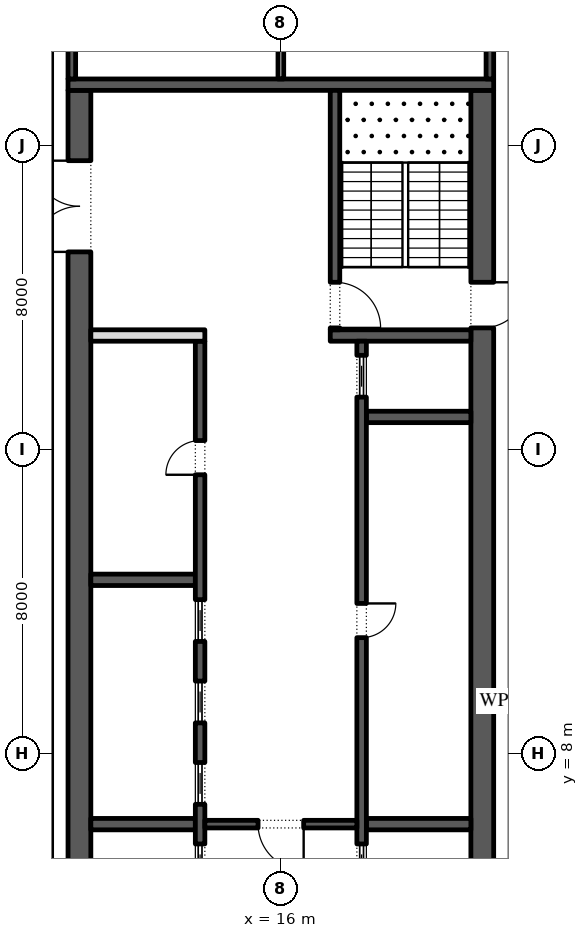
"""IFC4 building model, lengths in metres.
Left out: names, types, materials, properties, quantities, classifications, styles, units other than length and angle.
Written with IfcOpenShell. Run it as: python <this file> out.ifc"""

import sys

from ifc_helpers import new_model, si_unit, direction, frame, frame_2d, origin, place, context, subcontext, project, spatial, rectangle, extrude, element, fill, save


model = new_model("IFC4")
c1 = context("Model", 3, precision=1e-05, world=origin(), true_north=direction((0.0, 1.0)))
c2 = subcontext(c1, "Body", "Model", "MODEL_VIEW")
j1 = project(units=[si_unit("LENGTHUNIT", "METRE"), si_unit("PLANEANGLEUNIT", "RADIAN")], contexts=[c1])
p1 = place(None, origin())
s1 = spatial("IfcSite", under=j1, at=p1, CompositionType="ELEMENT")
p2 = place(p1, origin())
s2 = spatial("IfcBuilding", under=s1, at=p2, CompositionType="ELEMENT")
p3 = place(p2, frame((0.0, 0.0, 268.2)))
s3 = spatial("IfcBuildingStorey", under=s2, at=p3, CompositionType="ELEMENT", Elevation=268.2)
p4 = place(p3, frame((21.359, -11.678, 0.0), z_axis=(0.0, 0.0, 1.0), x_axis=(0.224949198343, 0.974370493275, 0.0)))
e1 = element("IfcWall", 1, at=p4, inside=s3, PredefinedType="STANDARD", context=c2, shape_type="SweptSolid", body=[
    extrude(rectangle(XDim=49.5, YDim=0.3, at=frame_2d((24.75, 0.0))), origin(), (0.0, 0.0, 1.0), 4.0),
])
p5 = place(p4, frame((1.157, 0.0, 0.45)))
e2 = element("IfcOpeningElement", 2, at=p5, cuts=e1, PredefinedType="OPENING", context=c2, shape_type="SweptSolid", body=[
    extrude(rectangle(XDim=4.5, YDim=3.05, at=frame_2d((2.25, 1.525))), frame((0.0, 0.16, 0.0), z_axis=(0.0, -1.0, 0.0), x_axis=(1.0, 0.0, 0.0)), (0.0, 0.0, 1.0), 0.32),
])
p6 = place(p4, frame((8.121, 0.0, 0.45)))
e3 = element("IfcOpeningElement", 3, at=p6, cuts=e1, PredefinedType="OPENING", context=c2, shape_type="SweptSolid", body=[
    extrude(rectangle(XDim=4.5, YDim=3.05, at=frame_2d((2.25, 1.525))), frame((0.0, 0.16, 0.0), z_axis=(0.0, -1.0, 0.0), x_axis=(1.0, 0.0, 0.0)), (0.0, 0.0, 1.0), 0.32),
])
p7 = place(p4, frame((15.236, 0.0, 0.45)))
e4 = element("IfcOpeningElement", 4, at=p7, cuts=e1, PredefinedType="OPENING", context=c2, shape_type="SweptSolid", body=[
    extrude(rectangle(XDim=4.5, YDim=3.05, at=frame_2d((2.25, 1.525))), frame((0.0, 0.16, 0.0), z_axis=(0.0, -1.0, 0.0), x_axis=(1.0, 0.0, 0.0)), (0.0, 0.0, 1.0), 0.32),
])
p8 = place(p4, frame((22.35, 0.0, 0.45)))
e5 = element("IfcOpeningElement", 5, at=p8, cuts=e1, PredefinedType="OPENING", context=c2, shape_type="SweptSolid", body=[
    extrude(rectangle(XDim=4.5, YDim=3.05, at=frame_2d((2.25, 1.525))), frame((0.0, 0.16, 0.0), z_axis=(0.0, -1.0, 0.0), x_axis=(1.0, 0.0, 0.0)), (0.0, 0.0, 1.0), 0.32),
])
p9 = place(p4, frame((29.464, 0.0, 0.45)))
e6 = element("IfcOpeningElement", 6, at=p9, cuts=e1, PredefinedType="OPENING", context=c2, shape_type="SweptSolid", body=[
    extrude(rectangle(XDim=4.5, YDim=2.95, at=frame_2d((2.25, 1.475))), frame((0.0, 0.16, 0.0), z_axis=(0.0, -1.0, 0.0), x_axis=(1.0, 0.0, 0.0)), (0.0, 0.0, 1.0), 0.32),
])
p10 = place(p4, frame((37.628, 0.0, 0.0)))
e7 = element("IfcOpeningElement", 7, at=p10, cuts=e1, PredefinedType="OPENING", context=c2, shape_type="SweptSolid", body=[
    extrude(rectangle(XDim=2.4, YDim=3.325, at=frame_2d((1.2, 1.663))), frame((0.0, 0.16, 0.0), z_axis=(0.0, -1.0, 0.0), x_axis=(1.0, 0.0, 0.0)), (0.0, 0.0, 1.0), 0.32),
])
p11 = place(p4, frame((43.693, 0.0, 0.45)))
e8 = element("IfcOpeningElement", 8, at=p11, cuts=e1, PredefinedType="OPENING", context=c2, shape_type="SweptSolid", body=[
    extrude(rectangle(XDim=4.5, YDim=3.05, at=frame_2d((2.25, 1.525))), frame((0.0, 0.16, 0.0), z_axis=(0.0, -1.0, 0.0), x_axis=(1.0, 0.0, 0.0)), (0.0, 0.0, 1.0), 0.32),
])
p12 = place(p3, frame((21.3, -2.45, 0.0), z_axis=(0.0, 0.0, 1.0), x_axis=(0.0, 1.0, 0.0)))
e9 = element("IfcWall", 9, at=p12, inside=s3, PredefinedType="SHEAR", context=c2, shape_type="SweptSolid", body=[
    extrude(rectangle(XDim=27.9, YDim=0.6, at=frame_2d((13.95, 0.0))), origin(), (0.0, 0.0, 1.0), 4.0),
])
p13 = place(p12, frame((5.05, 0.0, 0.0)))
e10 = element("IfcOpeningElement", 10, at=p13, cuts=e9, PredefinedType="OPENING", context=c2, shape_type="SweptSolid", body=[
    extrude(rectangle(XDim=1.2, YDim=2.1, at=frame_2d((0.6, 1.05))), frame((0.0, 0.31, 0.0), z_axis=(0.0, -1.0, 0.0), x_axis=(1.0, 0.0, 0.0)), (0.0, 0.0, 1.0), 0.62),
])
p14 = place(p12, frame((21.65, 0.0, 0.0)))
e11 = element("IfcOpeningElement", 11, at=p14, cuts=e9, PredefinedType="OPENING", context=c2, shape_type="SweptSolid", body=[
    extrude(rectangle(XDim=1.2, YDim=2.1, at=frame_2d((0.6, 1.05))), frame((0.0, 0.31, 0.0), z_axis=(0.0, -1.0, 0.0), x_axis=(1.0, 0.0, 0.0)), (0.0, 0.0, 1.0), 0.62),
])
p15 = place(p3, frame((10.7, -2.45, 0.0), z_axis=(0.0, 0.0, 1.0), x_axis=(0.0, 1.0, 0.0)))
e12 = element("IfcWall", 12, at=p15, inside=s3, PredefinedType="SHEAR", context=c2, shape_type="SweptSolid", body=[
    extrude(rectangle(XDim=27.9, YDim=0.6, at=frame_2d((13.95, 0.0))), origin(), (0.0, 0.0, 1.0), 4.0),
])
p16 = place(p15, frame((23.65, 0.0, 0.0)))
e13 = element("IfcOpeningElement", 13, at=p16, cuts=e12, PredefinedType="OPENING", context=c2, shape_type="SweptSolid", body=[
    extrude(rectangle(XDim=2.4, YDim=2.1, at=frame_2d((1.2, 1.05))), frame((0.0, 0.31, 0.0), z_axis=(0.0, -1.0, 0.0), x_axis=(1.0, 0.0, 0.0)), (0.0, 0.0, 1.0), 0.62),
])
p17 = place(p15, frame((1.087, 0.0, 0.0)))
e14 = element("IfcOpeningElement", 14, at=p17, cuts=e12, PredefinedType="OPENING", context=c2, shape_type="SweptSolid", body=[
    extrude(rectangle(XDim=0.9, YDim=2.1, at=frame_2d((0.45, 1.05))), frame((0.0, 0.31, 0.0), z_axis=(0.0, -1.0, 0.0), x_axis=(1.0, 0.0, 0.0)), (0.0, 0.0, 1.0), 0.62),
])
p18 = place(p15, frame((4.262, 0.0, 0.0)))
e15 = element("IfcOpeningElement", 15, at=p18, cuts=e12, PredefinedType="OPENING", context=c2, shape_type="SweptSolid", body=[
    extrude(rectangle(XDim=1.0, YDim=2.1, at=frame_2d((0.5, 1.05))), frame((0.0, 0.31, 0.0), z_axis=(0.0, -1.0, 0.0), x_axis=(1.0, 0.0, 0.0)), (0.0, 0.0, 1.0), 0.62),
])
p19 = place(p3, frame((10.4, 25.6, 0.0), z_axis=(0.0, 0.0, 1.0), x_axis=(1.0, 0.0, 0.0)))
e16 = element("IfcWall", 16, at=p19, inside=s3, PredefinedType="SHEAR", context=c2, shape_type="SweptSolid", body=[
    extrude(rectangle(XDim=11.2, YDim=0.3, at=frame_2d((5.6, 0.0))), origin(), (0.0, 0.0, 1.0), 4.0),
])
p20 = place(p3, frame((17.3, 19.0, 0.0), z_axis=(0.0, 0.0, 1.0), x_axis=(1.0, 0.0, 0.0)))
e17 = element("IfcWall", 17, at=p20, inside=s3, PredefinedType="SHEAR", context=c2, shape_type="SweptSolid", body=[
    extrude(rectangle(XDim=3.7, YDim=0.3, at=frame_2d((1.85, 0.0))), origin(), (0.0, 0.0, 1.0), 4.0),
])
p21 = place(p3, frame((17.425, 19.15, 0.0), z_axis=(0.0, 0.0, 1.0), x_axis=(0.0, 1.0, 0.0)))
e18 = element("IfcWall", 18, at=p21, inside=s3, PredefinedType="SHEAR", context=c2, shape_type="SweptSolid", body=[
    extrude(rectangle(XDim=6.3, YDim=0.25, at=frame_2d((3.15, 0.0))), origin(), (0.0, 0.0, 1.0), 4.0),
])
p22 = place(p21, frame((0.05, 0.0, 0.0)))
e19 = element("IfcOpeningElement", 19, at=p22, cuts=e18, PredefinedType="OPENING", context=c2, shape_type="SweptSolid", body=[
    extrude(rectangle(XDim=1.2, YDim=2.1, at=frame_2d((0.6, 1.05))), frame((0.0, 0.135, 0.0), z_axis=(0.0, -1.0, 0.0), x_axis=(1.0, 0.0, 0.0)), (0.0, 0.0, 1.0), 0.27),
])
for number, where, z_axis, x_axis in (
    (20, (18.25, 6.143, 0.0), (0.0, 0.0, 1.0), (1.0, 0.0, 0.0)),
    (21, (18.25, 16.857, 0.0), (0.0, 0.0, 1.0), (1.0, 0.0, 0.0)),
):
    element("IfcWall", number, at=place(p3, frame(where, z_axis=z_axis, x_axis=x_axis)), inside=s3, PredefinedType="SHEAR", context=c2, shape_type="SweptSolid", body=[
        extrude(rectangle(XDim=2.75, YDim=0.3, at=frame_2d((1.375, 0.0))), origin(), (0.0, 0.0, 1.0), 4.0),
    ])
p23 = place(p3, frame((18.125, 4.15, 0.0), z_axis=(0.0, 0.0, 1.0), x_axis=(0.0, 1.0, 0.0)))
e22 = element("IfcWall", 22, at=p23, inside=s3, PredefinedType="SHEAR", context=c2, shape_type="SweptSolid", body=[
    extrude(rectangle(XDim=14.7, YDim=0.25, at=frame_2d((7.35, 0.0))), origin(), (0.0, 0.0, 1.0), 4.0),
])
p24 = place(p23, frame((6.9, 0.0, 0.0)))
e23 = element("IfcOpeningElement", 23, at=p24, cuts=e22, PredefinedType="OPENING", context=c2, shape_type="SweptSolid", body=[
    extrude(rectangle(XDim=0.9, YDim=2.1, at=frame_2d((0.45, 1.05))), frame((0.0, 0.135, 0.0), z_axis=(0.0, -1.0, 0.0), x_axis=(1.0, 0.0, 0.0)), (0.0, 0.0, 1.0), 0.27),
])
p25 = place(p23, frame((0.371, 0.0, 0.0)))
e24 = element("IfcOpeningElement", 24, at=p25, cuts=e22, PredefinedType="OPENING", context=c2, shape_type="SweptSolid", body=[
    extrude(rectangle(XDim=1.1, YDim=2.1, at=frame_2d((0.55, 1.05))), frame((0.0, 0.135, 0.0), z_axis=(0.0, -1.0, 0.0), x_axis=(1.0, 0.0, 0.0)), (0.0, 0.0, 1.0), 0.27),
])
p26 = place(p23, frame((13.229, 0.0, 0.0)))
e25 = element("IfcOpeningElement", 25, at=p26, cuts=e22, PredefinedType="OPENING", context=c2, shape_type="SweptSolid", body=[
    extrude(rectangle(XDim=1.1, YDim=2.1, at=frame_2d((0.55, 1.05))), frame((0.0, 0.135, 0.0), z_axis=(0.0, -1.0, 0.0), x_axis=(1.0, 0.0, 0.0)), (0.0, 0.0, 1.0), 0.27),
])
for number, where, z_axis, x_axis in (
    (26, (11.0, 6.143, 0.0), (0.0, 0.0, 1.0), (1.0, 0.0, 0.0)),
    (27, (11.0, 12.571, 0.0), (0.0, 0.0, 1.0), (1.0, 0.0, 0.0)),
):
    element("IfcWall", number, at=place(p3, frame(where, z_axis=z_axis, x_axis=x_axis)), inside=s3, PredefinedType="SHEAR", context=c2, shape_type="SweptSolid", body=[
        extrude(rectangle(XDim=2.75, YDim=0.3, at=frame_2d((1.375, 0.0))), origin(), (0.0, 0.0, 1.0), 4.0),
    ])
p27 = place(p3, frame((13.875, -2.45, 0.0), z_axis=(0.0, 0.0, 1.0), x_axis=(0.0, 1.0, 0.0)))
e28 = element("IfcWall", 28, at=p27, inside=s3, PredefinedType="SHEAR", context=c2, shape_type="SweptSolid", body=[
    extrude(rectangle(XDim=21.3, YDim=0.25, at=frame_2d((10.65, 0.0))), origin(), (0.0, 0.0, 1.0), 4.0),
])
p28 = place(p27, frame((17.786, 0.0, 0.0)))
e29 = element("IfcOpeningElement", 29, at=p28, cuts=e28, PredefinedType="OPENING", context=c2, shape_type="SweptSolid", body=[
    extrude(rectangle(XDim=0.9, YDim=2.1, at=frame_2d((0.45, 1.05))), frame((0.0, 0.135, 0.0), z_axis=(0.0, -1.0, 0.0), x_axis=(1.0, 0.0, 0.0)), (0.0, 0.0, 1.0), 0.27),
])
p29 = place(p27, frame((6.971, 0.0, 0.0)))
e30 = element("IfcOpeningElement", 30, at=p29, cuts=e28, PredefinedType="OPENING", context=c2, shape_type="SweptSolid", body=[
    extrude(rectangle(XDim=1.1, YDim=2.1, at=frame_2d((0.55, 1.05))), frame((0.0, 0.135, 0.0), z_axis=(0.0, -1.0, 0.0), x_axis=(1.0, 0.0, 0.0)), (0.0, 0.0, 1.0), 0.27),
])
p30 = place(p27, frame((9.114, 0.0, 0.0)))
e31 = element("IfcOpeningElement", 31, at=p30, cuts=e28, PredefinedType="OPENING", context=c2, shape_type="SweptSolid", body=[
    extrude(rectangle(XDim=1.1, YDim=2.1, at=frame_2d((0.55, 1.05))), frame((0.0, 0.135, 0.0), z_axis=(0.0, -1.0, 0.0), x_axis=(1.0, 0.0, 0.0)), (0.0, 0.0, 1.0), 0.27),
])
p31 = place(p27, frame((11.257, 0.0, 0.0)))
e32 = element("IfcOpeningElement", 32, at=p31, cuts=e28, PredefinedType="OPENING", context=c2, shape_type="SweptSolid", body=[
    extrude(rectangle(XDim=1.1, YDim=2.1, at=frame_2d((0.55, 1.05))), frame((0.0, 0.135, 0.0), z_axis=(0.0, -1.0, 0.0), x_axis=(1.0, 0.0, 0.0)), (0.0, 0.0, 1.0), 0.27),
])
p32 = place(p27, frame((13.4, 0.0, 0.0)))
e33 = element("IfcOpeningElement", 33, at=p32, cuts=e28, PredefinedType="OPENING", context=c2, shape_type="SweptSolid", body=[
    extrude(rectangle(XDim=1.1, YDim=2.1, at=frame_2d((0.55, 1.05))), frame((0.0, 0.135, 0.0), z_axis=(0.0, -1.0, 0.0), x_axis=(1.0, 0.0, 0.0)), (0.0, 0.0, 1.0), 0.27),
])
p33 = place(p3, frame((11.0, 19.0, 0.0), z_axis=(0.0, 0.0, 1.0), x_axis=(1.0, 0.0, 0.0)))
e34 = element("IfcWall", 34, at=p33, inside=s3, PredefinedType="PARTITIONING", context=c2, shape_type="SweptSolid", body=[
    extrude(rectangle(XDim=3.0, YDim=0.3, at=frame_2d((1.5, 0.0))), origin(), (0.0, 0.0, 1.0), 4.0),
])
p34 = place(p3, frame((14.0, 6.143, 0.0), z_axis=(0.0, 0.0, 1.0), x_axis=(1.0, 0.0, 0.0)))
e35 = element("IfcWall", 35, at=p34, inside=s3, PredefinedType="SHEAR", context=c2, shape_type="SweptSolid", body=[
    extrude(rectangle(XDim=4.0, YDim=0.2, at=frame_2d((2.0, 0.0))), origin(), (0.0, 0.0, 1.0), 4.0),
])
p35 = place(p34, frame((1.4, 0.0, 0.0)))
e36 = element("IfcOpeningElement", 36, at=p35, cuts=e35, PredefinedType="OPENING", context=c2, shape_type="SweptSolid", body=[
    extrude(rectangle(XDim=1.2, YDim=2.1, at=frame_2d((0.6, 1.05))), frame((0.0, 0.11, 0.0), z_axis=(0.0, -1.0, 0.0), x_axis=(1.0, 0.0, 0.0)), (0.0, 0.0, 1.0), 0.22),
])
p36 = place(p3, frame((21.5, 25.75, 0.0), z_axis=(0.0, 0.0, 1.0), x_axis=(0.0, 1.0, 0.0)))
e37 = element("IfcWall", 37, at=p36, inside=s3, PredefinedType="SHEAR", context=c2, shape_type="SweptSolid", body=[
    extrude(rectangle(XDim=4.75, YDim=0.2, at=frame_2d((2.375, 0.0))), origin(), (0.0, 0.0, 1.0), 4.0),
])
p37 = place(p36, frame((1.925, 0.0, 0.0)))
e38 = element("IfcOpeningElement", 38, at=p37, cuts=e37, PredefinedType="OPENING", context=c2, shape_type="SweptSolid", body=[
    extrude(rectangle(XDim=0.9, YDim=2.1, at=frame_2d((0.45, 1.05))), frame((0.0, 0.11, 0.0), z_axis=(0.0, -1.0, 0.0), x_axis=(1.0, 0.0, 0.0)), (0.0, 0.0, 1.0), 0.22),
])
p38 = place(p3, frame((10.5, 25.75, 0.0), z_axis=(0.0, 0.0, 1.0), x_axis=(0.0, 1.0, 0.0)))
e39 = element("IfcWall", 39, at=p38, inside=s3, PredefinedType="SHEAR", context=c2, shape_type="SweptSolid", body=[
    extrude(rectangle(XDim=4.75, YDim=0.2, at=frame_2d((2.375, 0.0))), origin(), (0.0, 0.0, 1.0), 4.0),
])
p39 = place(p38, frame((1.925, 0.0, 0.0)))
e40 = element("IfcOpeningElement", 40, at=p39, cuts=e39, PredefinedType="OPENING", context=c2, shape_type="SweptSolid", body=[
    extrude(rectangle(XDim=0.9, YDim=2.1, at=frame_2d((0.45, 1.05))), frame((0.0, 0.11, 0.0), z_axis=(0.0, -1.0, 0.0), x_axis=(1.0, 0.0, 0.0)), (0.0, 0.0, 1.0), 0.22),
])
p40 = place(p3, frame((16.0, 25.75, 0.0), z_axis=(0.0, 0.0, 1.0), x_axis=(0.0, 1.0, 0.0)))
e41 = element("IfcWall", 41, at=p40, inside=s3, PredefinedType="PARTITIONING", context=c2, shape_type="SweptSolid", body=[
    extrude(rectangle(XDim=4.75, YDim=0.15, at=frame_2d((2.375, 0.0))), origin(), (0.0, 0.0, 1.0), 4.0),
])
p41 = place(p24, frame((0.9, -0.2, 0.0), z_axis=(0.0, 0.0, 1.0), x_axis=(-1.0, 0.0, 0.0)))
e42 = element("IfcDoor", 42, at=p41, inside=s3, OperationType="SINGLE_SWING_RIGHT", PredefinedType="DOOR", context=c2, shape_type="SweptSolid", body=[
    extrude(rectangle(XDim=0.9, YDim=2.1, at=frame_2d((0.45, 1.05))), frame((0.0, -0.075, 0.0), z_axis=(0.0, -1.0, 0.0), x_axis=(1.0, 0.0, 0.0)), (0.0, 0.0, 1.0), 0.05),
])
fill(e23, e42)
p42 = place(p25, origin())
e43 = element("IfcDoor", 43, at=p42, inside=s3, OperationType="SLIDING_TO_LEFT", PredefinedType="DOOR", context=c2, shape_type="SweptSolid", body=[
    extrude(rectangle(XDim=1.1, YDim=2.1, at=frame_2d((0.55, 1.05))), frame((0.0, 0.025, 0.0), z_axis=(0.0, -1.0, 0.0), x_axis=(1.0, 0.0, 0.0)), (0.0, 0.0, 1.0), 0.05),
])
fill(e24, e43)
p43 = place(p26, origin())
e44 = element("IfcDoor", 44, at=p43, inside=s3, OperationType="SLIDING_TO_LEFT", PredefinedType="DOOR", context=c2, shape_type="SweptSolid", body=[
    extrude(rectangle(XDim=1.1, YDim=2.1, at=frame_2d((0.55, 1.05))), frame((0.0, 0.025, 0.0), z_axis=(0.0, -1.0, 0.0), x_axis=(1.0, 0.0, 0.0)), (0.0, 0.0, 1.0), 0.05),
])
fill(e25, e44)
p44 = place(p28, origin())
e45 = element("IfcDoor", 45, at=p44, inside=s3, OperationType="SINGLE_SWING_RIGHT", PredefinedType="DOOR", context=c2, shape_type="SweptSolid", body=[
    extrude(rectangle(XDim=0.9, YDim=2.1, at=frame_2d((0.45, 1.05))), frame((0.0, 0.125, 0.0), z_axis=(0.0, -1.0, 0.0), x_axis=(1.0, 0.0, 0.0)), (0.0, 0.0, 1.0), 0.05),
])
fill(e29, e45)
p45 = place(p29, origin())
e46 = element("IfcDoor", 46, at=p45, inside=s3, OperationType="SLIDING_TO_LEFT", PredefinedType="DOOR", context=c2, shape_type="SweptSolid", body=[
    extrude(rectangle(XDim=1.1, YDim=2.1, at=frame_2d((0.55, 1.05))), frame((0.0, 0.025, 0.0), z_axis=(0.0, -1.0, 0.0), x_axis=(1.0, 0.0, 0.0)), (0.0, 0.0, 1.0), 0.05),
])
fill(e30, e46)
p46 = place(p30, origin())
e47 = element("IfcDoor", 47, at=p46, inside=s3, OperationType="SLIDING_TO_LEFT", PredefinedType="DOOR", context=c2, shape_type="SweptSolid", body=[
    extrude(rectangle(XDim=1.1, YDim=2.1, at=frame_2d((0.55, 1.05))), frame((0.0, 0.025, 0.0), z_axis=(0.0, -1.0, 0.0), x_axis=(1.0, 0.0, 0.0)), (0.0, 0.0, 1.0), 0.05),
])
fill(e31, e47)
p47 = place(p31, origin())
e48 = element("IfcDoor", 48, at=p47, inside=s3, OperationType="SLIDING_TO_LEFT", PredefinedType="DOOR", context=c2, shape_type="SweptSolid", body=[
    extrude(rectangle(XDim=1.1, YDim=2.1, at=frame_2d((0.55, 1.05))), frame((0.0, 0.025, 0.0), z_axis=(0.0, -1.0, 0.0), x_axis=(1.0, 0.0, 0.0)), (0.0, 0.0, 1.0), 0.05),
])
fill(e32, e48)
p48 = place(p32, origin())
e49 = element("IfcDoor", 49, at=p48, inside=s3, OperationType="SLIDING_TO_LEFT", PredefinedType="DOOR", context=c2, shape_type="SweptSolid", body=[
    extrude(rectangle(XDim=1.1, YDim=2.1, at=frame_2d((0.55, 1.05))), frame((0.0, 0.025, 0.0), z_axis=(0.0, -1.0, 0.0), x_axis=(1.0, 0.0, 0.0)), (0.0, 0.0, 1.0), 0.05),
])
fill(e33, e49)
p49 = place(p35, frame((1.2, 0.0, 0.0), z_axis=(0.0, 0.0, 1.0), x_axis=(-1.0, 0.0, 0.0)))
e50 = element("IfcDoor", 50, at=p49, inside=s3, OperationType="SINGLE_SWING_RIGHT", PredefinedType="DOOR", context=c2, shape_type="SweptSolid", body=[
    extrude(rectangle(XDim=1.2, YDim=2.1, at=frame_2d((0.6, 1.05))), frame((0.0, 0.025, 0.0), z_axis=(0.0, -1.0, 0.0), x_axis=(1.0, 0.0, 0.0)), (0.0, 0.0, 1.0), 0.05),
])
fill(e36, e50)
p50 = place(p16, origin())
e51 = element("IfcDoor", 51, at=p50, inside=s3, OperationType="DOUBLE_DOOR_SINGLE_SWING", PredefinedType="DOOR", context=c2, shape_type="SweptSolid", body=[
    extrude(rectangle(XDim=2.4, YDim=2.1, at=frame_2d((1.2, 1.05))), frame((0.0, 0.025, 0.0), z_axis=(0.0, -1.0, 0.0), x_axis=(1.0, 0.0, 0.0)), (0.0, 0.0, 1.0), 0.05),
])
fill(e13, e51)
p51 = place(p22, frame((1.2, 0.0, 0.0), z_axis=(0.0, 0.0, 1.0), x_axis=(-1.0, 0.0, 0.0)))
e52 = element("IfcDoor", 52, at=p51, inside=s3, OperationType="SINGLE_SWING_LEFT", PredefinedType="DOOR", context=c2, shape_type="SweptSolid", body=[
    extrude(rectangle(XDim=1.2, YDim=2.1, at=frame_2d((0.6, 1.05))), frame((0.0, 0.025, 0.0), z_axis=(0.0, -1.0, 0.0), x_axis=(1.0, 0.0, 0.0)), (0.0, 0.0, 1.0), 0.05),
])
fill(e19, e52)
p52 = place(p14, frame((1.2, 0.0, 0.0), z_axis=(0.0, 0.0, 1.0), x_axis=(-1.0, 0.0, 0.0)))
e53 = element("IfcDoor", 53, at=p52, inside=s3, OperationType="SINGLE_SWING_RIGHT", PredefinedType="DOOR", context=c2, shape_type="SweptSolid", body=[
    extrude(rectangle(XDim=1.2, YDim=2.1, at=frame_2d((0.6, 1.05))), frame((0.0, 0.025, 0.0), z_axis=(0.0, -1.0, 0.0), x_axis=(1.0, 0.0, 0.0)), (0.0, 0.0, 1.0), 0.05),
])
fill(e11, e53)
save(model, sys.argv[1])
